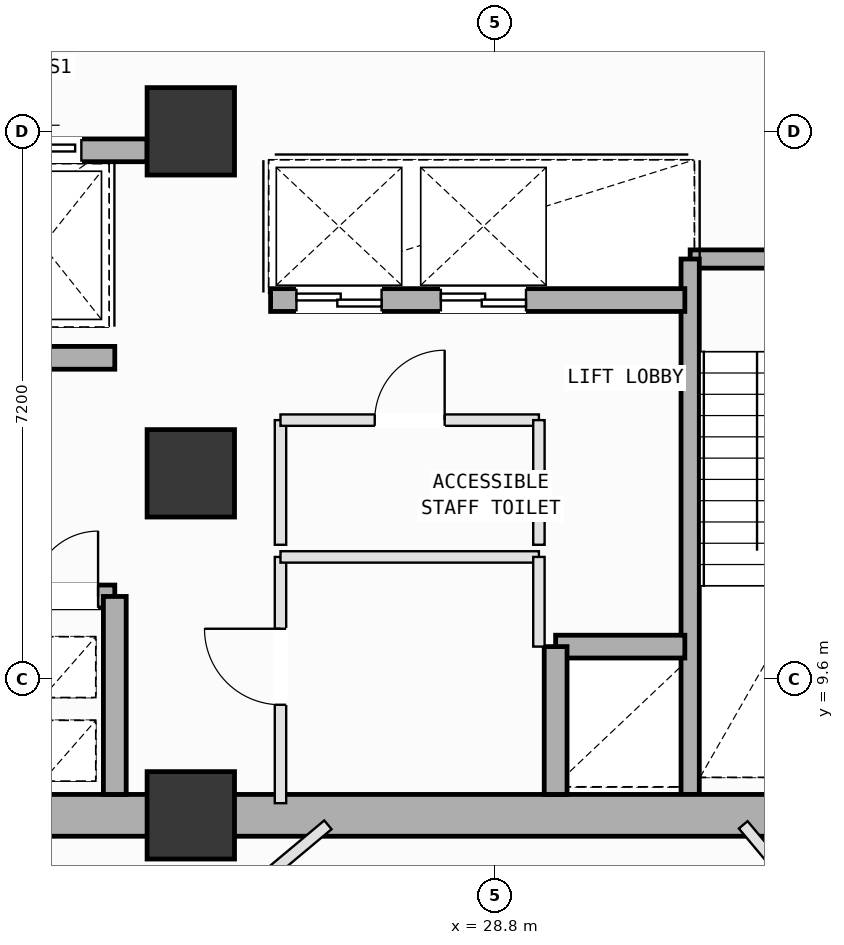
"""IFC4 building model, lengths in metres.
Left out: names, types, materials, properties, quantities, classifications, styles, units other than length and angle.
Written with IfcOpenShell. Run it as: python <this file> out.ifc"""

import sys

from ifc_helpers import new_model, si_unit, direction, frame, frame_2d, origin, origin_2d, place, context, subcontext, project, spatial, rectangle, extrude, element, fill, save


model = new_model("IFC4")
c1 = context("Model", 3, precision=1e-05, world=origin(), true_north=direction((0.0, 1.0)))
c2 = subcontext(c1, "Body", "Model", "MODEL_VIEW")
j1 = project(units=[si_unit("LENGTHUNIT", "METRE"), si_unit("PLANEANGLEUNIT", "RADIAN")], contexts=[c1])
p1 = place(None, origin())
s1 = spatial("IfcSite", under=j1, at=p1, CompositionType="ELEMENT")
p2 = place(p1, origin())
s2 = spatial("IfcBuilding", under=s1, at=p2, CompositionType="ELEMENT")
p3 = place(p2, frame((0.0, 0.0, 193.8)))
s3 = spatial("IfcBuildingStorey", under=s2, at=p3, CompositionType="ELEMENT", Elevation=193.8)
for number, where, z_axis, x_axis in (
    (1, (24.8, 7.8, 0.0), (0.0, 0.0, 1.0), (1.0, 0.0, 0.0)),
    (2, (24.8, 12.3, 0.0), (0.0, 0.0, 1.0), (1.0, 0.0, 0.0)),
    (3, (24.8, 16.8, 0.0), (0.0, 0.0, 1.0), (1.0, 0.0, 0.0)),
):
    element("IfcColumn", number, at=place(p3, frame(where, z_axis=z_axis, x_axis=x_axis)), inside=s3, PredefinedType="COLUMN", context=c2, shape_type="SweptSolid", body=[
        extrude(rectangle(XDim=1.15, YDim=1.15, at=origin_2d()), origin(), (0.0, 0.0, 1.0), 4.0),
    ])
p4 = place(p3, frame((31.37, 15.12, 0.0), z_axis=(0.0, 0.0, 1.0), x_axis=(1.0, 0.0, 0.0)))
e4 = element("IfcWall", 4, at=p4, inside=s3, PredefinedType="SOLIDWALL", context=c2, shape_type="SweptSolid", body=[
    extrude(rectangle(XDim=3.46, YDim=0.24, at=frame_2d((1.73, 0.0))), origin(), (0.0, 0.0, 1.0), 3.78),
])
p5 = place(p4, frame((2.14, 0.0, 0.0)))
e5 = element("IfcOpeningElement", 5, at=p5, cuts=e4, PredefinedType="OPENING", context=c2, shape_type="SweptSolid", body=[
    extrude(rectangle(XDim=1.1, YDim=2.15, at=frame_2d((0.55, 1.075))), frame((0.0, 0.13, 0.0), z_axis=(0.0, -1.0, 0.0), x_axis=(1.0, 0.0, 0.0)), (0.0, 0.0, 1.0), 0.26),
])
p6 = place(p3, frame((31.37, 8.075, 0.0), z_axis=(0.0, 0.0, 1.0), x_axis=(0.0, 1.0, 0.0)))
e6 = element("IfcWall", 6, at=p6, inside=s3, PredefinedType="SOLIDWALL", context=c2, shape_type="SweptSolid", body=[
    extrude(rectangle(XDim=7.045, YDim=0.24, at=frame_2d((3.522, 0.0))), origin(), (0.0, 0.0, 1.0), 3.78),
])
for number, where, z_axis, x_axis in (
    (7, (14.0, 7.8, 0.0), (0.0, 0.0, 1.0), (1.0, 0.0, 0.0)),
    (8, (24.8, 7.8, 0.0), (0.0, 0.0, 1.0), (1.0, 0.0, 0.0)),
):
    element("IfcWall", number, at=place(p3, frame(where, z_axis=z_axis, x_axis=x_axis)), inside=s3, PredefinedType="SHEAR", context=c2, shape_type="SweptSolid", body=[
        extrude(rectangle(XDim=10.8, YDim=0.55, at=frame_2d((5.4, 0.0))), origin(), (0.0, 0.0, 1.0), 3.78),
    ])
p7 = place(p3, frame((19.85, 16.55, 0.0), z_axis=(0.0, 0.0, 1.0), x_axis=(1.0, 0.0, 0.0)))
e9 = element("IfcWall", 9, at=p7, inside=s3, PredefinedType="SOLIDWALL", context=c2, shape_type="SweptSolid", body=[
    extrude(rectangle(XDim=4.375, YDim=0.3, at=frame_2d((2.188, 0.0))), origin(), (0.0, 0.0, 1.0), 3.78),
])
p8 = place(p7, frame((0.475, 0.0, 0.0)))
e10 = element("IfcOpeningElement", 10, at=p8, cuts=e9, PredefinedType="OPENING", context=c2, shape_type="SweptSolid", body=[
    extrude(rectangle(XDim=1.25, YDim=2.18, at=frame_2d((0.625, 1.09))), frame((0.0, 0.16, 0.0), z_axis=(0.0, -1.0, 0.0), x_axis=(1.0, 0.0, 0.0)), (0.0, 0.0, 1.0), 0.32),
])
p9 = place(p7, frame((2.49, 0.0, 0.0)))
e11 = element("IfcOpeningElement", 11, at=p9, cuts=e9, PredefinedType="OPENING", context=c2, shape_type="SweptSolid", body=[
    extrude(rectangle(XDim=1.02, YDim=2.12, at=frame_2d((0.51, 1.06))), frame((0.0, 0.16, 0.0), z_axis=(0.0, -1.0, 0.0), x_axis=(1.0, 0.0, 0.0)), (0.0, 0.0, 1.0), 0.32),
])
p10 = place(p3, frame((18.5, 10.68, 0.0), z_axis=(0.0, 0.0, 1.0), x_axis=(1.0, 0.0, 0.0)))
e12 = element("IfcWall", 12, at=p10, inside=s3, PredefinedType="SOLIDWALL", context=c2, shape_type="SweptSolid", body=[
    extrude(rectangle(XDim=5.3, YDim=0.3, at=frame_2d((2.65, 0.0))), origin(), (0.0, 0.0, 1.0), 3.78),
])
p11 = place(p10, frame((4.22, 0.0, 0.0)))
e13 = element("IfcOpeningElement", 13, at=p11, cuts=e12, PredefinedType="OPENING", context=c2, shape_type="SweptSolid", body=[
    extrude(rectangle(XDim=0.86, YDim=2.06, at=frame_2d((0.43, 1.03))), frame((0.0, 0.16, 0.0), z_axis=(0.0, -1.0, 0.0), x_axis=(1.0, 0.0, 0.0)), (0.0, 0.0, 1.0), 0.32),
])
p12 = place(p10, frame((0.425, 0.0, 0.0)))
e14 = element("IfcOpeningElement", 14, at=p12, cuts=e12, PredefinedType="OPENING", context=c2, shape_type="SweptSolid", body=[
    extrude(rectangle(XDim=1.25, YDim=2.18, at=frame_2d((0.625, 1.09))), frame((0.0, 0.16, 0.0), z_axis=(0.0, -1.0, 0.0), x_axis=(1.0, 0.0, 0.0)), (0.0, 0.0, 1.0), 0.32),
])
p13 = place(p10, frame((2.525, 0.0, 0.0)))
e15 = element("IfcOpeningElement", 15, at=p13, cuts=e12, PredefinedType="OPENING", context=c2, shape_type="SweptSolid", body=[
    extrude(rectangle(XDim=1.25, YDim=2.18, at=frame_2d((0.625, 1.09))), frame((0.0, 0.16, 0.0), z_axis=(0.0, -1.0, 0.0), x_axis=(1.0, 0.0, 0.0)), (0.0, 0.0, 1.0), 0.32),
])
p14 = place(p3, frame((18.5, 13.82, 0.0), z_axis=(0.0, 0.0, 1.0), x_axis=(1.0, 0.0, 0.0)))
e16 = element("IfcWall", 16, at=p14, inside=s3, PredefinedType="SOLIDWALL", context=c2, shape_type="SweptSolid", body=[
    extrude(rectangle(XDim=5.3, YDim=0.3, at=frame_2d((2.65, 0.0))), origin(), (0.0, 0.0, 1.0), 3.78),
])
p15 = place(p14, frame((0.18, 0.0, 0.0)))
e17 = element("IfcOpeningElement", 17, at=p15, cuts=e16, PredefinedType="OPENING", context=c2, shape_type="SweptSolid", body=[
    extrude(rectangle(XDim=1.1, YDim=2.15, at=frame_2d((0.55, 1.075))), frame((0.0, 0.16, 0.0), z_axis=(0.0, -1.0, 0.0), x_axis=(1.0, 0.0, 0.0)), (0.0, 0.0, 1.0), 0.32),
])
p16 = place(p3, frame((23.8, 8.075, 0.0), z_axis=(0.0, 0.0, 1.0), x_axis=(0.0, 1.0, 0.0)))
e18 = element("IfcWall", 18, at=p16, inside=s3, PredefinedType="SOLIDWALL", context=c2, shape_type="SweptSolid", body=[
    extrude(rectangle(XDim=2.605, YDim=0.3, at=frame_2d((1.302, 0.0))), origin(), (0.0, 0.0, 1.0), 3.78),
])
p17 = place(p3, frame((29.6, 10.02, 0.0), z_axis=(0.0, 0.0, 1.0), x_axis=(1.0, 0.0, 0.0)))
e19 = element("IfcWall", 19, at=p17, inside=s3, PredefinedType="SOLIDWALL", context=c2, shape_type="SweptSolid", body=[
    extrude(rectangle(XDim=1.7, YDim=0.3, at=frame_2d((0.85, 0.0))), origin(), (0.0, 0.0, 1.0), 3.78),
])
p18 = place(p3, frame((29.6, 8.075, 0.0), z_axis=(0.0, 0.0, 1.0), x_axis=(0.0, 1.0, 0.0)))
e20 = element("IfcWall", 20, at=p18, inside=s3, PredefinedType="SOLIDWALL", context=c2, shape_type="SweptSolid", body=[
    extrude(rectangle(XDim=1.945, YDim=0.3, at=frame_2d((0.973, 0.0))), origin(), (0.0, 0.0, 1.0), 3.78),
])
p19 = place(p3, frame((25.85, 14.58, 0.0), z_axis=(0.0, 0.0, 1.0), x_axis=(1.0, 0.0, 0.0)))
e21 = element("IfcWall", 21, at=p19, inside=s3, PredefinedType="SOLIDWALL", context=c2, shape_type="SweptSolid", body=[
    extrude(rectangle(XDim=5.45, YDim=0.3, at=frame_2d((2.725, 0.0))), origin(), (0.0, 0.0, 1.0), 3.78),
])
p20 = place(p19, frame((0.34, 0.0, 0.0)))
e22 = element("IfcOpeningElement", 22, at=p20, cuts=e21, PredefinedType="OPENING", context=c2, shape_type="SweptSolid", body=[
    extrude(rectangle(XDim=1.12, YDim=2.15, at=frame_2d((0.56, 1.075))), frame((0.0, 0.16, 0.0), z_axis=(0.0, -1.0, 0.0), x_axis=(1.0, 0.0, 0.0)), (0.0, 0.0, 1.0), 0.32),
])
p21 = place(p19, frame((2.24, 0.0, 0.0)))
e23 = element("IfcOpeningElement", 23, at=p21, cuts=e21, PredefinedType="OPENING", context=c2, shape_type="SweptSolid", body=[
    extrude(rectangle(XDim=1.12, YDim=2.15, at=frame_2d((0.56, 1.075))), frame((0.0, 0.16, 0.0), z_axis=(0.0, -1.0, 0.0), x_axis=(1.0, 0.0, 0.0)), (0.0, 0.0, 1.0), 0.32),
])
p22 = place(p3, frame((25.98, 7.96, 0.0), z_axis=(0.0, 0.0, 1.0), x_axis=(0.0, 1.0, 0.0)))
e24 = element("IfcWall", 24, at=p22, inside=s3, PredefinedType="PARTITIONING", context=c2, shape_type="SweptSolid", body=[
    extrude(rectangle(XDim=3.24, YDim=0.15, at=frame_2d((1.62, 0.0))), origin(), (0.0, 0.0, 1.0), 3.78),
])
p23 = place(p22, frame((1.295, 0.0, 0.0)))
e25 = element("IfcOpeningElement", 25, at=p23, cuts=e24, PredefinedType="OPENING", context=c2, shape_type="SweptSolid", body=[
    extrude(rectangle(XDim=1.0, YDim=2.12, at=frame_2d((0.5, 1.06))), frame((0.0, 0.085, 0.0), z_axis=(0.0, -1.0, 0.0), x_axis=(1.0, 0.0, 0.0)), (0.0, 0.0, 1.0), 0.17),
])
p24 = place(p3, frame((25.98, 11.2, 0.0), z_axis=(0.0, 0.0, 1.0), x_axis=(1.0, 0.0, 0.0)))
e26 = element("IfcWall", 26, at=p24, inside=s3, PredefinedType="PARTITIONING", context=c2, shape_type="SweptSolid", body=[
    extrude(rectangle(XDim=3.4, YDim=0.15, at=frame_2d((1.7, 0.0))), origin(), (0.0, 0.0, 1.0), 3.78),
])
p25 = place(p3, frame((29.38, 11.2, 0.0), z_axis=(0.0, 0.0, 1.0), x_axis=(0.0, -1.0, 0.0)))
e27 = element("IfcWall", 27, at=p25, inside=s3, PredefinedType="PARTITIONING", context=c2, shape_type="SweptSolid", body=[
    extrude(rectangle(XDim=1.18, YDim=0.15, at=frame_2d((0.59, 0.0))), origin(), (0.0, 0.0, 1.0), 3.78),
])
p26 = place(p3, frame((25.98, 11.36, 0.0), z_axis=(0.0, 0.0, 1.0), x_axis=(0.0, 1.0, 0.0)))
e28 = element("IfcWall", 28, at=p26, inside=s3, PredefinedType="PARTITIONING", context=c2, shape_type="SweptSolid", body=[
    extrude(rectangle(XDim=1.64, YDim=0.15, at=frame_2d((0.82, 0.0))), origin(), (0.0, 0.0, 1.0), 3.78),
])
p27 = place(p3, frame((25.98, 13.0, 0.0), z_axis=(0.0, 0.0, 1.0), x_axis=(1.0, 0.0, 0.0)))
e29 = element("IfcWall", 29, at=p27, inside=s3, PredefinedType="PARTITIONING", context=c2, shape_type="SweptSolid", body=[
    extrude(rectangle(XDim=3.4, YDim=0.15, at=frame_2d((1.7, 0.0))), origin(), (0.0, 0.0, 1.0), 3.78),
])
p28 = place(p27, frame((1.24, 0.0, 0.0)))
e30 = element("IfcOpeningElement", 30, at=p28, cuts=e29, PredefinedType="OPENING", context=c2, shape_type="SweptSolid", body=[
    extrude(rectangle(XDim=0.92, YDim=2.1, at=frame_2d((0.46, 1.05))), frame((0.0, 0.085, 0.0), z_axis=(0.0, -1.0, 0.0), x_axis=(1.0, 0.0, 0.0)), (0.0, 0.0, 1.0), 0.17),
])
p29 = place(p3, frame((29.38, 13.0, 0.0), z_axis=(0.0, 0.0, 1.0), x_axis=(0.0, -1.0, 0.0)))
e31 = element("IfcWall", 31, at=p29, inside=s3, PredefinedType="PARTITIONING", context=c2, shape_type="SweptSolid", body=[
    extrude(rectangle(XDim=1.64, YDim=0.15, at=frame_2d((0.82, 0.0))), origin(), (0.0, 0.0, 1.0), 3.78),
])
p30 = place(p3, frame((23.959, 5.463, 0.0), z_axis=(0.0, 0.0, 1.0), x_axis=(0.767082571844, 0.64154838319, 0.0)))
e32 = element("IfcWall", 32, at=p30, inside=s3, PredefinedType="PARTITIONING", context=c2, shape_type="SweptSolid", body=[
    extrude(rectangle(XDim=3.448, YDim=0.15, at=frame_2d((1.724, 0.0))), origin(), (0.0, 0.0, 1.0), 3.78),
])
p31 = place(p3, frame((32.068, 7.675, 0.0), z_axis=(0.0, 0.0, 1.0), x_axis=(0.641475635529, -0.767143408381, 0.0)))
e33 = element("IfcWall", 33, at=p31, inside=s3, PredefinedType="PARTITIONING", context=c2, shape_type="SweptSolid", body=[
    extrude(rectangle(XDim=9.98, YDim=0.15, at=frame_2d((4.99, 0.0))), origin(), (0.0, 0.0, 1.0), 3.78),
])
p32 = place(p31, frame((4.757, 0.0, 0.0)))
e34 = element("IfcOpeningElement", 34, at=p32, cuts=e33, PredefinedType="OPENING", context=c2, shape_type="SweptSolid", body=[
    extrude(rectangle(XDim=0.86, YDim=2.06, at=frame_2d((0.43, 1.03))), frame((0.0, 0.085, 0.0), z_axis=(0.0, -1.0, 0.0), x_axis=(1.0, 0.0, 0.0)), (0.0, 0.0, 1.0), 0.17),
])
p33 = place(p11, origin())
e35 = element("IfcDoor", 35, at=p33, inside=s3, OperationType="SINGLE_SWING_RIGHT", PredefinedType="DOOR", context=c2, shape_type="SweptSolid", body=[
    extrude(rectangle(XDim=0.86, YDim=2.06, at=frame_2d((0.43, 1.03))), frame((0.0, 0.025, 0.0), z_axis=(0.0, -1.0, 0.0), x_axis=(1.0, 0.0, 0.0)), (0.0, 0.0, 1.0), 0.05),
])
fill(e13, e35)
p34 = place(p20, origin())
e36 = element("IfcDoor", 36, at=p34, inside=s3, OperationType="DOUBLE_DOOR_SLIDING", PredefinedType="DOOR", context=c2, shape_type="SweptSolid", body=[
    extrude(rectangle(XDim=1.12, YDim=2.15, at=frame_2d((0.56, 1.075))), frame((0.0, 0.025, 0.0), z_axis=(0.0, -1.0, 0.0), x_axis=(1.0, 0.0, 0.0)), (0.0, 0.0, 1.0), 0.05),
])
fill(e22, e36)
p35 = place(p21, origin())
e37 = element("IfcDoor", 37, at=p35, inside=s3, OperationType="DOUBLE_DOOR_SLIDING", PredefinedType="DOOR", context=c2, shape_type="SweptSolid", body=[
    extrude(rectangle(XDim=1.12, YDim=2.15, at=frame_2d((0.56, 1.075))), frame((0.0, 0.025, 0.0), z_axis=(0.0, -1.0, 0.0), x_axis=(1.0, 0.0, 0.0)), (0.0, 0.0, 1.0), 0.05),
])
fill(e23, e37)
p36 = place(p9, origin())
e38 = element("IfcDoor", 38, at=p36, inside=s3, OperationType="SLIDING_TO_LEFT", PredefinedType="DOOR", context=c2, shape_type="SweptSolid", body=[
    extrude(rectangle(XDim=1.02, YDim=2.12, at=frame_2d((0.51, 1.06))), frame((0.0, 0.025, 0.0), z_axis=(0.0, -1.0, 0.0), x_axis=(1.0, 0.0, 0.0)), (0.0, 0.0, 1.0), 0.05),
])
fill(e11, e38)
p37 = place(p23, origin())
e39 = element("IfcDoor", 39, at=p37, inside=s3, OperationType="SINGLE_SWING_RIGHT", PredefinedType="DOOR", context=c2, shape_type="SweptSolid", body=[
    extrude(rectangle(XDim=1.0, YDim=2.12, at=frame_2d((0.5, 1.06))), frame((0.0, 0.025, 0.0), z_axis=(0.0, -1.0, 0.0), x_axis=(1.0, 0.0, 0.0)), (0.0, 0.0, 1.0), 0.05),
])
fill(e25, e39)
p38 = place(p28, origin())
e40 = element("IfcDoor", 40, at=p38, inside=s3, OperationType="SINGLE_SWING_RIGHT", PredefinedType="DOOR", context=c2, shape_type="SweptSolid", body=[
    extrude(rectangle(XDim=0.92, YDim=2.1, at=frame_2d((0.46, 1.05))), frame((0.0, 0.025, 0.0), z_axis=(0.0, -1.0, 0.0), x_axis=(1.0, 0.0, 0.0)), (0.0, 0.0, 1.0), 0.05),
])
fill(e30, e40)
save(model, sys.argv[1])
